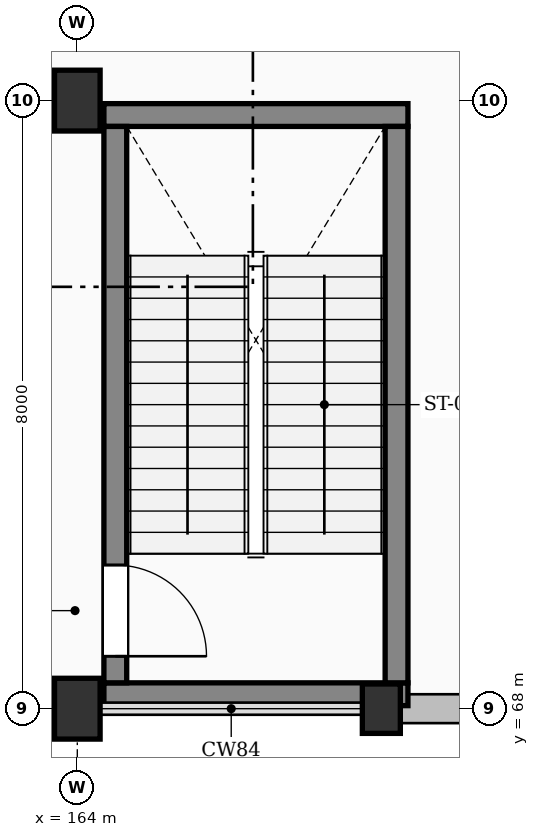
"""IFC4 building model, lengths in metres.
Left out: names, types, materials, properties, quantities, classifications, styles, units other than length and angle.
Written with IfcOpenShell. Run it as: python <this file> out.ifc"""

import sys

from ifc_helpers import new_model, si_unit, direction, frame, frame_2d, origin, origin_2d, place, context, subcontext, project, spatial, rectangle, extrude, element, fill, save


model = new_model("IFC4")
c1 = context("Model", 3, precision=1e-05, world=origin(), true_north=direction((0.0, 1.0)))
c2 = subcontext(c1, "Body", "Model", "MODEL_VIEW")
j1 = project(units=[si_unit("LENGTHUNIT", "METRE"), si_unit("PLANEANGLEUNIT", "RADIAN")], contexts=[c1])
p1 = place(None, origin())
s1 = spatial("IfcSite", under=j1, at=p1, CompositionType="ELEMENT")
p2 = place(p1, origin())
s2 = spatial("IfcBuilding", under=s1, at=p2, CompositionType="ELEMENT")
p3 = place(p2, frame((0.0, 0.0, 4.8)))
s3 = spatial("IfcBuildingStorey", under=s2, at=p3, CompositionType="ELEMENT", Elevation=4.8)
for number, where, z_axis, x_axis in (
    (1, (164.0, 68.0, 0.0), (0.0, 0.0, 1.0), (1.0, 0.0, 0.0)),
    (2, (164.0, 76.0, 0.0), (0.0, 0.0, 1.0), (1.0, 0.0, 0.0)),
):
    element("IfcColumn", number, at=place(p3, frame(where, z_axis=z_axis, x_axis=x_axis)), inside=s3, PredefinedType="COLUMN", context=c2, shape_type="SweptSolid", body=[
        extrude(rectangle(XDim=0.6, YDim=0.8, at=origin_2d()), origin(), (0.0, 0.0, 1.0), 4.5),
    ])
p4 = place(p3, frame((168.0, 68.0, 0.0), z_axis=(0.0, 0.0, 1.0), x_axis=(1.0, 0.0, 0.0)))
e3 = element("IfcColumn", 3, at=p4, inside=s3, PredefinedType="PILASTER", context=c2, shape_type="SweptSolid", body=[
    extrude(rectangle(XDim=0.5, YDim=0.65, at=origin_2d()), origin(), (0.0, 0.0, 1.0), 4.5),
])
p5 = place(p3, frame((171.7, 68.0, 0.0), z_axis=(0.0, 0.0, 1.0), x_axis=(-1.0, 0.0, 0.0)))
e4 = element("IfcWall", 4, at=p5, inside=s3, PredefinedType="SOLIDWALL", context=c2, shape_type="SweptSolid", body=[
    extrude(rectangle(XDim=3.45, YDim=0.38, at=frame_2d((1.725, 0.0))), origin(), (0.0, 0.0, 1.0), 3.685),
])
p6 = place(p5, frame((1.225, 0.0, 0.95)))
e5 = element("IfcOpeningElement", 5, at=p6, cuts=e4, PredefinedType="OPENING", context=c2, shape_type="SweptSolid", body=[
    extrude(rectangle(XDim=1.0, YDim=1.4, at=frame_2d((0.5, 0.7))), frame((0.0, 0.2, 0.0), z_axis=(0.0, -1.0, 0.0), x_axis=(1.0, 0.0, 0.0)), (0.0, 0.0, 1.0), 0.4),
])
p7 = place(p3, frame((163.7, 68.0, 0.0), z_axis=(0.0, 0.0, 1.0), x_axis=(-1.0, 0.0, 0.0)))
e6 = element("IfcWall", 6, at=p7, inside=s3, PredefinedType="SOLIDWALL", context=c2, shape_type="SweptSolid", body=[
    extrude(rectangle(XDim=3.5, YDim=0.38, at=frame_2d((1.75, 0.0))), origin(), (0.0, 0.0, 1.0), 3.735),
])
p8 = place(p7, frame((1.2, 0.0, 0.95)))
e7 = element("IfcOpeningElement", 7, at=p8, cuts=e6, PredefinedType="OPENING", context=c2, shape_type="SweptSolid", body=[
    extrude(rectangle(XDim=1.1, YDim=2.0, at=frame_2d((0.55, 1.0))), frame((0.0, 0.2, 0.0), z_axis=(0.0, -1.0, 0.0), x_axis=(1.0, 0.0, 0.0)), (0.0, 0.0, 1.0), 0.4),
])
for number, where, z_axis, x_axis in (
    (8, (164.35, 68.19, 0.0), (0.0, 0.0, 1.0), (1.0, 0.0, 0.0)),
    (9, (168.35, 75.81, 0.0), (0.0, 0.0, 1.0), (-1.0, 0.0, 0.0)),
):
    element("IfcWall", number, at=place(p3, frame(where, z_axis=z_axis, x_axis=x_axis)), inside=s3, PredefinedType="SHEAR", context=c2, shape_type="SweptSolid", body=[
        extrude(rectangle(XDim=4.0, YDim=0.3, at=frame_2d((2.0, 0.0))), origin(), (0.0, 0.0, 1.0), 4.25),
    ])
p9 = place(p3, frame((164.5, 75.66, 0.0), z_axis=(0.0, 0.0, 1.0), x_axis=(0.0, -1.0, 0.0)))
e10 = element("IfcWall", 10, at=p9, inside=s3, PredefinedType="SHEAR", context=c2, shape_type="SweptSolid", body=[
    extrude(rectangle(XDim=7.32, YDim=0.3, at=frame_2d((3.66, 0.0))), origin(), (0.0, 0.0, 1.0), 4.25),
])
p10 = place(p9, frame((5.77, 0.0, 0.0)))
e11 = element("IfcOpeningElement", 11, at=p10, cuts=e10, PredefinedType="OPENING", context=c2, shape_type="SweptSolid", body=[
    extrude(rectangle(XDim=1.2, YDim=2.15, at=frame_2d((0.6, 1.075))), frame((0.0, 0.16, 0.0), z_axis=(0.0, -1.0, 0.0), x_axis=(1.0, 0.0, 0.0)), (0.0, 0.0, 1.0), 0.32),
])
p11 = place(p3, frame((168.2, 75.66, 0.0), z_axis=(0.0, 0.0, 1.0), x_axis=(0.0, -1.0, 0.0)))
e12 = element("IfcWall", 12, at=p11, inside=s3, PredefinedType="SHEAR", context=c2, shape_type="SweptSolid", body=[
    extrude(rectangle(XDim=7.32, YDim=0.3, at=frame_2d((3.66, 0.0))), origin(), (0.0, 0.0, 1.0), 4.25),
])
p12 = place(p10, origin())
e13 = element("IfcDoor", 13, at=p12, inside=s3, OperationType="SINGLE_SWING_RIGHT", PredefinedType="DOOR", context=c2, shape_type="SweptSolid", body=[
    extrude(rectangle(XDim=1.2, YDim=2.15, at=frame_2d((0.6, 1.075))), frame((0.0, 0.025, 0.0), z_axis=(0.0, -1.0, 0.0), x_axis=(1.0, 0.0, 0.0)), (0.0, 0.0, 1.0), 0.05),
])
fill(e11, e13)
save(model, sys.argv[1])
